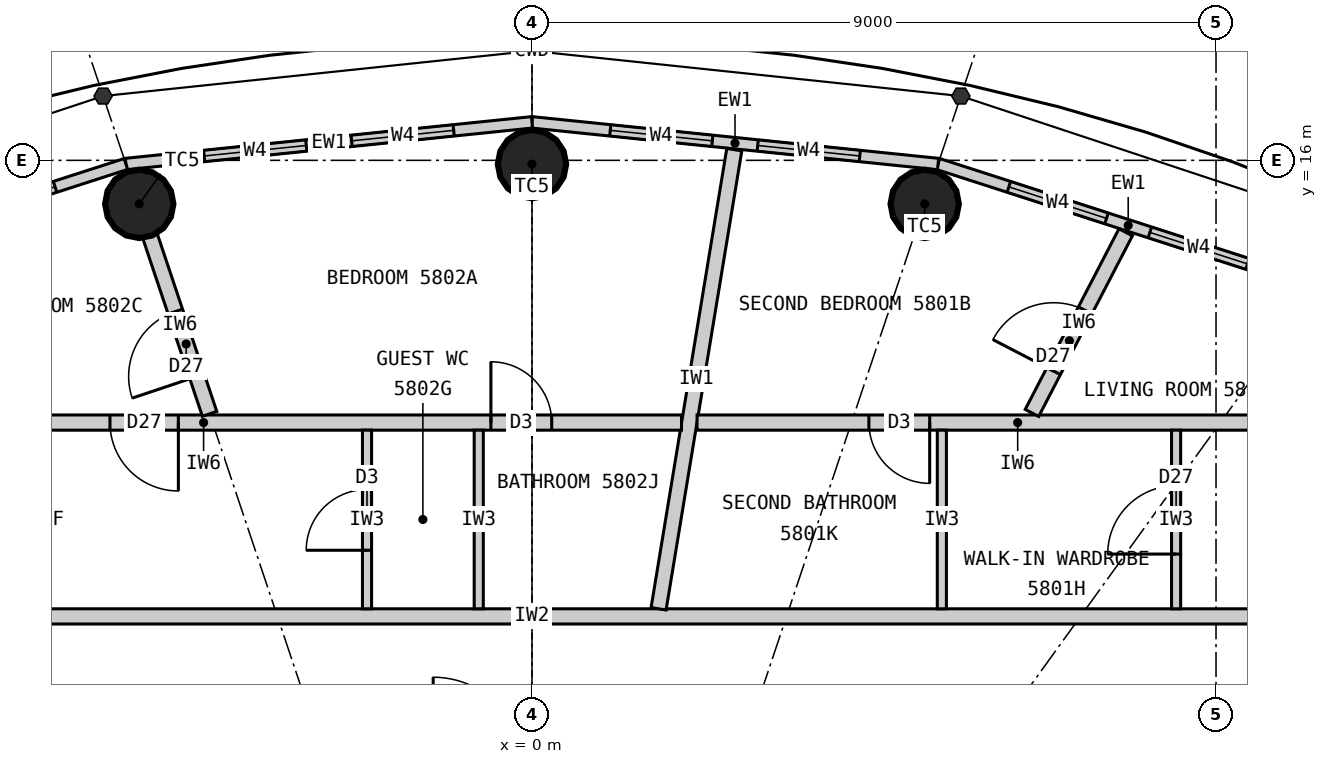
"""IFC4 building model, lengths in metres.
Left out: names, types, materials, properties, quantities, classifications, styles, units other than length and angle.
Written with IfcOpenShell. Run it as: python <this file> out.ifc"""

import sys

from ifc_helpers import new_model, si_unit, direction, frame, frame_2d, origin, origin_2d, place, context, subcontext, project, spatial, rectangle, circle, extrude, element, fill, save


model = new_model("IFC4")
c1 = context("Model", 3, precision=1e-05, world=origin(), true_north=direction((0.0, 1.0)))
c2 = subcontext(c1, "Body", "Model", "MODEL_VIEW")
j1 = project(units=[si_unit("LENGTHUNIT", "METRE"), si_unit("PLANEANGLEUNIT", "RADIAN")], contexts=[c1])
p1 = place(None, origin())
s1 = spatial("IfcSite", under=j1, at=p1, CompositionType="ELEMENT")
p2 = place(p1, origin())
s2 = spatial("IfcBuilding", under=s1, at=p2, CompositionType="ELEMENT")
p3 = place(p2, frame((0.0, 0.0, 216.0)))
s3 = spatial("IfcBuildingStorey", under=s2, at=p3, CompositionType="ELEMENT", Elevation=216.0)
for number, where, z_axis, x_axis in (
    (1, (5.167, 15.427, 0.0), (0.0, 0.0, 1.0), (1.0, 0.0, 0.0)),
    (2, (0.0, 15.95, 0.0), (0.0, 0.0, 1.0), (1.0, 0.0, 0.0)),
    (3, (-5.167, 15.427, 0.0), (0.0, 0.0, 1.0), (1.0, 0.0, 0.0)),
):
    element("IfcColumn", number, at=place(p3, frame(where, z_axis=z_axis, x_axis=x_axis)), inside=s3, PredefinedType="COLUMN", context=c2, shape_type="SweptSolid", body=[
        extrude(circle(Radius=0.45, at=origin_2d()), origin(), (0.0, 0.0, 1.0), 3.3),
    ])
p4 = place(p3, frame((10.346, 14.336, 0.0), z_axis=(0.0, 0.0, 1.0), x_axis=(-0.951644702515, 0.307200846638, 0.0)))
e4 = element("IfcWall", 4, at=p4, inside=s3, PredefinedType="ELEMENTEDWALL", context=c2, shape_type="SweptSolid", body=[
    extrude(rectangle(XDim=5.258, YDim=0.15, at=frame_2d((2.629, 0.0))), origin(), (0.0, 0.0, 1.0), 3.12),
])
p5 = place(p4, frame((0.979, 0.0, 0.9)))
e5 = element("IfcOpeningElement", 5, at=p5, cuts=e4, PredefinedType="OPENING", context=c2, shape_type="SweptSolid", body=[
    extrude(rectangle(XDim=1.35, YDim=1.9, at=frame_2d((0.675, 0.95))), frame((0.0, 0.085, 0.0), z_axis=(0.0, -1.0, 0.0), x_axis=(1.0, 0.0, 0.0)), (0.0, 0.0, 1.0), 0.17),
])
p6 = place(p4, frame((2.929, 0.0, 0.9)))
e6 = element("IfcOpeningElement", 6, at=p6, cuts=e4, PredefinedType="OPENING", context=c2, shape_type="SweptSolid", body=[
    extrude(rectangle(XDim=1.35, YDim=1.9, at=frame_2d((0.675, 0.95))), frame((0.0, 0.085, 0.0), z_axis=(0.0, -1.0, 0.0), x_axis=(1.0, 0.0, 0.0)), (0.0, 0.0, 1.0), 0.17),
])
p7 = place(p3, frame((5.343, 15.952, 0.0), z_axis=(0.0, 0.0, 1.0), x_axis=(-0.994774574972, 0.102095763818, 0.0)))
e7 = element("IfcWall", 7, at=p7, inside=s3, PredefinedType="ELEMENTEDWALL", context=c2, shape_type="SweptSolid", body=[
    extrude(rectangle(XDim=5.371, YDim=0.15, at=frame_2d((2.686, 0.0))), origin(), (0.0, 0.0, 1.0), 3.12),
])
p8 = place(p7, frame((1.035, 0.0, 0.9)))
e8 = element("IfcOpeningElement", 8, at=p8, cuts=e7, PredefinedType="OPENING", context=c2, shape_type="SweptSolid", body=[
    extrude(rectangle(XDim=1.35, YDim=1.9, at=frame_2d((0.675, 0.95))), frame((0.0, 0.085, 0.0), z_axis=(0.0, -1.0, 0.0), x_axis=(1.0, 0.0, 0.0)), (0.0, 0.0, 1.0), 0.17),
])
p9 = place(p7, frame((2.985, 0.0, 0.9)))
e9 = element("IfcOpeningElement", 9, at=p9, cuts=e7, PredefinedType="OPENING", context=c2, shape_type="SweptSolid", body=[
    extrude(rectangle(XDim=1.35, YDim=1.9, at=frame_2d((0.675, 0.95))), frame((0.0, 0.085, 0.0), z_axis=(0.0, -1.0, 0.0), x_axis=(1.0, 0.0, 0.0)), (0.0, 0.0, 1.0), 0.17),
])
p10 = place(p3, frame((0.0, 16.5, 0.0), z_axis=(0.0, 0.0, 1.0), x_axis=(-0.994774574972, -0.102095763818, 0.0)))
e10 = element("IfcWall", 10, at=p10, inside=s3, PredefinedType="ELEMENTEDWALL", context=c2, shape_type="SweptSolid", body=[
    extrude(rectangle(XDim=5.371, YDim=0.15, at=frame_2d((2.686, 0.0))), origin(), (0.0, 0.0, 1.0), 3.12),
])
p11 = place(p10, frame((1.035, 0.0, 0.9)))
e11 = element("IfcOpeningElement", 11, at=p11, cuts=e10, PredefinedType="OPENING", context=c2, shape_type="SweptSolid", body=[
    extrude(rectangle(XDim=1.35, YDim=1.9, at=frame_2d((0.675, 0.95))), frame((0.0, 0.085, 0.0), z_axis=(0.0, -1.0, 0.0), x_axis=(1.0, 0.0, 0.0)), (0.0, 0.0, 1.0), 0.17),
])
p12 = place(p10, frame((2.985, 0.0, 0.9)))
e12 = element("IfcOpeningElement", 12, at=p12, cuts=e10, PredefinedType="OPENING", context=c2, shape_type="SweptSolid", body=[
    extrude(rectangle(XDim=1.35, YDim=1.9, at=frame_2d((0.675, 0.95))), frame((0.0, 0.085, 0.0), z_axis=(0.0, -1.0, 0.0), x_axis=(1.0, 0.0, 0.0)), (0.0, 0.0, 1.0), 0.17),
])
p13 = place(p3, frame((-5.343, 15.952, 0.0), z_axis=(0.0, 0.0, 1.0), x_axis=(-0.951644702515, -0.307200846638, 0.0)))
e13 = element("IfcWall", 13, at=p13, inside=s3, PredefinedType="ELEMENTEDWALL", context=c2, shape_type="SweptSolid", body=[
    extrude(rectangle(XDim=5.258, YDim=0.15, at=frame_2d((2.629, 0.0))), origin(), (0.0, 0.0, 1.0), 3.12),
])
p14 = place(p13, frame((0.979, 0.0, 0.9)))
e14 = element("IfcOpeningElement", 14, at=p14, cuts=e13, PredefinedType="OPENING", context=c2, shape_type="SweptSolid", body=[
    extrude(rectangle(XDim=1.35, YDim=1.9, at=frame_2d((0.675, 0.95))), frame((0.0, 0.085, 0.0), z_axis=(0.0, -1.0, 0.0), x_axis=(1.0, 0.0, 0.0)), (0.0, 0.0, 1.0), 0.17),
])
p15 = place(p13, frame((2.929, 0.0, 0.9)))
e15 = element("IfcOpeningElement", 15, at=p15, cuts=e13, PredefinedType="OPENING", context=c2, shape_type="SweptSolid", body=[
    extrude(rectangle(XDim=1.35, YDim=1.9, at=frame_2d((0.675, 0.95))), frame((0.0, 0.085, 0.0), z_axis=(0.0, -1.0, 0.0), x_axis=(1.0, 0.0, 0.0)), (0.0, 0.0, 1.0), 0.17),
])
p16 = place(p3, frame((-11.1, 10.0, 0.0), z_axis=(0.0, 0.0, 1.0), x_axis=(1.0, 0.0, 0.0)))
e16 = element("IfcWall", 16, at=p16, inside=s3, PredefinedType="PARTITIONING", context=c2, shape_type="SweptSolid", body=[
    extrude(rectangle(XDim=22.2, YDim=0.2, at=frame_2d((11.1, 0.0))), origin(), (0.0, 0.0, 1.0), 3.12),
])
p17 = place(p16, frame((20.9, 0.0, 0.0)))
e17 = element("IfcOpeningElement", 17, at=p17, cuts=e16, PredefinedType="OPENING", context=c2, shape_type="SweptSolid", body=[
    extrude(rectangle(XDim=1.0, YDim=2.2, at=frame_2d((0.5, 1.1))), frame((0.0, 0.11, 0.0), z_axis=(0.0, -1.0, 0.0), x_axis=(1.0, 0.0, 0.0)), (0.0, 0.0, 1.0), 0.22),
])
p18 = place(p16, frame((2.82, 0.0, 0.0)))
e18 = element("IfcOpeningElement", 18, at=p18, cuts=e16, PredefinedType="OPENING", context=c2, shape_type="SweptSolid", body=[
    extrude(rectangle(XDim=1.0, YDim=2.2, at=frame_2d((0.5, 1.1))), frame((0.0, 0.11, 0.0), z_axis=(0.0, -1.0, 0.0), x_axis=(1.0, 0.0, 0.0)), (0.0, 0.0, 1.0), 0.22),
])
p19 = place(p3, frame((1.666, 10.1, 0.0), z_axis=(0.0, 0.0, 1.0), x_axis=(0.162710847913, 0.986673796131, 0.0)))
e19 = element("IfcWall", 19, at=p19, inside=s3, PredefinedType="PARTITIONING", context=c2, shape_type="SweptSolid", body=[
    extrude(rectangle(XDim=6.122, YDim=0.2, at=frame_2d((3.061, 0.0))), origin(), (0.0, 0.0, 1.0), 3.12),
])
p20 = place(p3, frame((10.609, 12.55, 0.0), z_axis=(0.0, 0.0, 1.0), x_axis=(-1.0, 0.0, 0.0)))
e20 = element("IfcWall", 20, at=p20, inside=s3, PredefinedType="PARTITIONING", context=c2, shape_type="SweptSolid", body=[
    extrude(rectangle(XDim=8.437, YDim=0.2, at=frame_2d((4.218, 0.0))), origin(), (0.0, 0.0, 1.0), 3.12),
])
p21 = place(p20, frame((5.376, 0.0, 0.0)))
e21 = element("IfcOpeningElement", 21, at=p21, cuts=e20, PredefinedType="OPENING", context=c2, shape_type="SweptSolid", body=[
    extrude(rectangle(XDim=0.8, YDim=2.1, at=frame_2d((0.4, 1.05))), frame((0.0, 0.11, 0.0), z_axis=(0.0, -1.0, 0.0), x_axis=(1.0, 0.0, 0.0)), (0.0, 0.0, 1.0), 0.22),
])
p22 = place(p3, frame((6.578, 12.677, 0.0), z_axis=(0.0, 0.0, 1.0), x_axis=(0.460620531465, 0.887597164255, 0.0)))
e22 = element("IfcWall", 22, at=p22, inside=s3, PredefinedType="PARTITIONING", context=c2, shape_type="SweptSolid", body=[
    extrude(rectangle(XDim=2.678, YDim=0.2, at=frame_2d((1.339, 0.0))), origin(), (0.0, 0.0, 1.0), 3.12),
])
p23 = place(p22, frame((0.62, 0.0, 0.0)))
e23 = element("IfcOpeningElement", 23, at=p23, cuts=e22, PredefinedType="OPENING", context=c2, shape_type="SweptSolid", body=[
    extrude(rectangle(XDim=0.9, YDim=2.1, at=frame_2d((0.45, 1.05))), frame((0.0, 0.11, 0.0), z_axis=(0.0, -1.0, 0.0), x_axis=(1.0, 0.0, 0.0)), (0.0, 0.0, 1.0), 0.22),
])
p24 = place(p3, frame((8.475, 10.1, 0.0), z_axis=(0.0, 0.0, 1.0), x_axis=(0.0, 1.0, 0.0)))
e24 = element("IfcWall", 24, at=p24, inside=s3, PredefinedType="PARTITIONING", context=c2, shape_type="SweptSolid", body=[
    extrude(rectangle(XDim=2.35, YDim=0.12, at=frame_2d((1.175, 0.0))), origin(), (0.0, 0.0, 1.0), 3.12),
])
p25 = place(p24, frame((0.72, 0.0, 0.0)))
e25 = element("IfcOpeningElement", 25, at=p25, cuts=e24, PredefinedType="OPENING", context=c2, shape_type="SweptSolid", body=[
    extrude(rectangle(XDim=0.9, YDim=2.1, at=frame_2d((0.45, 1.05))), frame((0.0, 0.07, 0.0), z_axis=(0.0, -1.0, 0.0), x_axis=(1.0, 0.0, 0.0)), (0.0, 0.0, 1.0), 0.14),
])
p26 = place(p3, frame((5.393, 10.1, 0.0), z_axis=(0.0, 0.0, 1.0), x_axis=(0.0, 1.0, 0.0)))
e26 = element("IfcWall", 26, at=p26, inside=s3, PredefinedType="PARTITIONING", context=c2, shape_type="SweptSolid", body=[
    extrude(rectangle(XDim=2.35, YDim=0.12, at=frame_2d((1.175, 0.0))), origin(), (0.0, 0.0, 1.0), 3.12),
])
p27 = place(p3, frame((1.968, 12.55, 0.0), z_axis=(0.0, 0.0, 1.0), x_axis=(-1.0, 0.0, 0.0)))
e27 = element("IfcWall", 27, at=p27, inside=s3, PredefinedType="PARTITIONING", context=c2, shape_type="SweptSolid", body=[
    extrude(rectangle(XDim=12.576, YDim=0.2, at=frame_2d((6.288, 0.0))), origin(), (0.0, 0.0, 1.0), 3.12),
])
p28 = place(p27, frame((1.708, 0.0, 0.0)))
e28 = element("IfcOpeningElement", 28, at=p28, cuts=e27, PredefinedType="OPENING", context=c2, shape_type="SweptSolid", body=[
    extrude(rectangle(XDim=0.8, YDim=2.1, at=frame_2d((0.4, 1.05))), frame((0.0, 0.11, 0.0), z_axis=(0.0, -1.0, 0.0), x_axis=(1.0, 0.0, 0.0)), (0.0, 0.0, 1.0), 0.22),
])
p29 = place(p27, frame((6.62, 0.0, 0.0)))
e29 = element("IfcOpeningElement", 29, at=p29, cuts=e27, PredefinedType="OPENING", context=c2, shape_type="SweptSolid", body=[
    extrude(rectangle(XDim=0.9, YDim=2.1, at=frame_2d((0.45, 1.05))), frame((0.0, 0.11, 0.0), z_axis=(0.0, -1.0, 0.0), x_axis=(1.0, 0.0, 0.0)), (0.0, 0.0, 1.0), 0.22),
])
p30 = place(p3, frame((-4.242, 12.664, 0.0), z_axis=(0.0, 0.0, 1.0), x_axis=(-0.317594928911, 0.948226481981, 0.0)))
e30 = element("IfcWall", 30, at=p30, inside=s3, PredefinedType="PARTITIONING", context=c2, shape_type="SweptSolid", body=[
    extrude(rectangle(XDim=2.464, YDim=0.2, at=frame_2d((1.232, 0.0))), origin(), (0.0, 0.0, 1.0), 2.42),
])
p31 = place(p30, frame((0.52, 0.0, 0.0)))
e31 = element("IfcOpeningElement", 31, at=p31, cuts=e30, PredefinedType="OPENING", context=c2, shape_type="SweptSolid", body=[
    extrude(rectangle(XDim=0.9, YDim=2.1, at=frame_2d((0.45, 1.05))), frame((0.0, 0.11, 0.0), z_axis=(0.0, -1.0, 0.0), x_axis=(1.0, 0.0, 0.0)), (0.0, 0.0, 1.0), 0.22),
])
p32 = place(p3, frame((-0.7, 10.1, 0.0), z_axis=(0.0, 0.0, 1.0), x_axis=(0.0, 1.0, 0.0)))
e32 = element("IfcWall", 32, at=p32, inside=s3, PredefinedType="PARTITIONING", context=c2, shape_type="SweptSolid", body=[
    extrude(rectangle(XDim=2.35, YDim=0.12, at=frame_2d((1.175, 0.0))), origin(), (0.0, 0.0, 1.0), 3.12),
])
p33 = place(p3, frame((-2.17, 10.1, 0.0), z_axis=(0.0, 0.0, 1.0), x_axis=(0.0, 1.0, 0.0)))
e33 = element("IfcWall", 33, at=p33, inside=s3, PredefinedType="PARTITIONING", context=c2, shape_type="SweptSolid", body=[
    extrude(rectangle(XDim=2.35, YDim=0.12, at=frame_2d((1.175, 0.0))), origin(), (0.0, 0.0, 1.0), 3.12),
])
p34 = place(p33, frame((0.77, 0.0, 0.0)))
e34 = element("IfcOpeningElement", 34, at=p34, cuts=e33, PredefinedType="OPENING", context=c2, shape_type="SweptSolid", body=[
    extrude(rectangle(XDim=0.8, YDim=2.1, at=frame_2d((0.4, 1.05))), frame((0.0, 0.07, 0.0), z_axis=(0.0, -1.0, 0.0), x_axis=(1.0, 0.0, 0.0)), (0.0, 0.0, 1.0), 0.14),
])
p35 = place(p5, origin())
e35 = element("IfcWindow", 35, at=p35, inside=s3, PartitioningType="SINGLE_PANEL", PredefinedType="WINDOW", context=c2, shape_type="SweptSolid", body=[
    extrude(rectangle(XDim=1.35, YDim=1.9, at=frame_2d((0.675, 0.95))), frame((0.0, 0.03, 0.0), z_axis=(0.0, -1.0, 0.0), x_axis=(1.0, 0.0, 0.0)), (0.0, 0.0, 1.0), 0.06),
])
fill(e5, e35)
p36 = place(p6, origin())
e36 = element("IfcWindow", 36, at=p36, inside=s3, PartitioningType="SINGLE_PANEL", PredefinedType="WINDOW", context=c2, shape_type="SweptSolid", body=[
    extrude(rectangle(XDim=1.35, YDim=1.9, at=frame_2d((0.675, 0.95))), frame((0.0, 0.03, 0.0), z_axis=(0.0, -1.0, 0.0), x_axis=(1.0, 0.0, 0.0)), (0.0, 0.0, 1.0), 0.06),
])
fill(e6, e36)
p37 = place(p8, origin())
e37 = element("IfcWindow", 37, at=p37, inside=s3, PartitioningType="SINGLE_PANEL", PredefinedType="WINDOW", context=c2, shape_type="SweptSolid", body=[
    extrude(rectangle(XDim=1.35, YDim=1.9, at=frame_2d((0.675, 0.95))), frame((0.0, 0.03, 0.0), z_axis=(0.0, -1.0, 0.0), x_axis=(1.0, 0.0, 0.0)), (0.0, 0.0, 1.0), 0.06),
])
fill(e8, e37)
p38 = place(p9, origin())
e38 = element("IfcWindow", 38, at=p38, inside=s3, PartitioningType="SINGLE_PANEL", PredefinedType="WINDOW", context=c2, shape_type="SweptSolid", body=[
    extrude(rectangle(XDim=1.35, YDim=1.9, at=frame_2d((0.675, 0.95))), frame((0.0, 0.03, 0.0), z_axis=(0.0, -1.0, 0.0), x_axis=(1.0, 0.0, 0.0)), (0.0, 0.0, 1.0), 0.06),
])
fill(e9, e38)
p39 = place(p11, origin())
e39 = element("IfcWindow", 39, at=p39, inside=s3, PartitioningType="SINGLE_PANEL", PredefinedType="WINDOW", context=c2, shape_type="SweptSolid", body=[
    extrude(rectangle(XDim=1.35, YDim=1.9, at=frame_2d((0.675, 0.95))), frame((0.0, 0.03, 0.0), z_axis=(0.0, -1.0, 0.0), x_axis=(1.0, 0.0, 0.0)), (0.0, 0.0, 1.0), 0.06),
])
fill(e11, e39)
p40 = place(p12, origin())
e40 = element("IfcWindow", 40, at=p40, inside=s3, PartitioningType="SINGLE_PANEL", PredefinedType="WINDOW", context=c2, shape_type="SweptSolid", body=[
    extrude(rectangle(XDim=1.35, YDim=1.9, at=frame_2d((0.675, 0.95))), frame((0.0, 0.03, 0.0), z_axis=(0.0, -1.0, 0.0), x_axis=(1.0, 0.0, 0.0)), (0.0, 0.0, 1.0), 0.06),
])
fill(e12, e40)
p41 = place(p14, origin())
e41 = element("IfcWindow", 41, at=p41, inside=s3, PartitioningType="SINGLE_PANEL", PredefinedType="WINDOW", context=c2, shape_type="SweptSolid", body=[
    extrude(rectangle(XDim=1.35, YDim=1.9, at=frame_2d((0.675, 0.95))), frame((0.0, 0.03, 0.0), z_axis=(0.0, -1.0, 0.0), x_axis=(1.0, 0.0, 0.0)), (0.0, 0.0, 1.0), 0.06),
])
fill(e14, e41)
p42 = place(p25, origin())
e42 = element("IfcDoor", 42, at=p42, inside=s3, OperationType="SINGLE_SWING_LEFT", PredefinedType="DOOR", context=c2, shape_type="SweptSolid", body=[
    extrude(rectangle(XDim=0.9, YDim=2.1, at=frame_2d((0.45, 1.05))), frame((0.0, 0.025, 0.0), z_axis=(0.0, -1.0, 0.0), x_axis=(1.0, 0.0, 0.0)), (0.0, 0.0, 1.0), 0.05),
])
fill(e25, e42)
p43 = place(p21, origin())
e43 = element("IfcDoor", 43, at=p43, inside=s3, OperationType="SINGLE_SWING_LEFT", PredefinedType="DOOR", context=c2, shape_type="SweptSolid", body=[
    extrude(rectangle(XDim=0.8, YDim=2.1, at=frame_2d((0.4, 1.05))), frame((0.0, 0.025, 0.0), z_axis=(0.0, -1.0, 0.0), x_axis=(1.0, 0.0, 0.0)), (0.0, 0.0, 1.0), 0.05),
])
fill(e21, e43)
p44 = place(p23, origin())
e44 = element("IfcDoor", 44, at=p44, inside=s3, OperationType="SINGLE_SWING_LEFT", PredefinedType="DOOR", context=c2, shape_type="SweptSolid", body=[
    extrude(rectangle(XDim=0.9, YDim=2.1, at=frame_2d((0.45, 1.05))), frame((0.0, 0.025, 0.0), z_axis=(0.0, -1.0, 0.0), x_axis=(1.0, 0.0, 0.0)), (0.0, 0.0, 1.0), 0.05),
])
fill(e23, e44)
p45 = place(p28, origin())
e45 = element("IfcDoor", 45, at=p45, inside=s3, OperationType="SINGLE_SWING_RIGHT", PredefinedType="DOOR", context=c2, shape_type="SweptSolid", body=[
    extrude(rectangle(XDim=0.8, YDim=2.1, at=frame_2d((0.4, 1.05))), frame((0.0, 0.025, 0.0), z_axis=(0.0, -1.0, 0.0), x_axis=(1.0, 0.0, 0.0)), (0.0, 0.0, 1.0), 0.05),
])
fill(e28, e45)
p46 = place(p34, origin())
e46 = element("IfcDoor", 46, at=p46, inside=s3, OperationType="SINGLE_SWING_LEFT", PredefinedType="DOOR", context=c2, shape_type="SweptSolid", body=[
    extrude(rectangle(XDim=0.8, YDim=2.1, at=frame_2d((0.4, 1.05))), frame((0.0, 0.025, 0.0), z_axis=(0.0, -1.0, 0.0), x_axis=(1.0, 0.0, 0.0)), (0.0, 0.0, 1.0), 0.05),
])
fill(e34, e46)
p47 = place(p29, origin())
e47 = element("IfcDoor", 47, at=p47, inside=s3, OperationType="SINGLE_SWING_LEFT", PredefinedType="DOOR", context=c2, shape_type="SweptSolid", body=[
    extrude(rectangle(XDim=0.9, YDim=2.1, at=frame_2d((0.45, 1.05))), frame((0.0, 0.025, 0.0), z_axis=(0.0, -1.0, 0.0), x_axis=(1.0, 0.0, 0.0)), (0.0, 0.0, 1.0), 0.05),
])
fill(e29, e47)
p48 = place(p31, origin())
e48 = element("IfcDoor", 48, at=p48, inside=s3, OperationType="SINGLE_SWING_LEFT", PredefinedType="DOOR", context=c2, shape_type="SweptSolid", body=[
    extrude(rectangle(XDim=0.9, YDim=2.1, at=frame_2d((0.45, 1.05))), frame((0.0, 0.025, 0.0), z_axis=(0.0, -1.0, 0.0), x_axis=(1.0, 0.0, 0.0)), (0.0, 0.0, 1.0), 0.05),
])
fill(e31, e48)
save(model, sys.argv[1])
